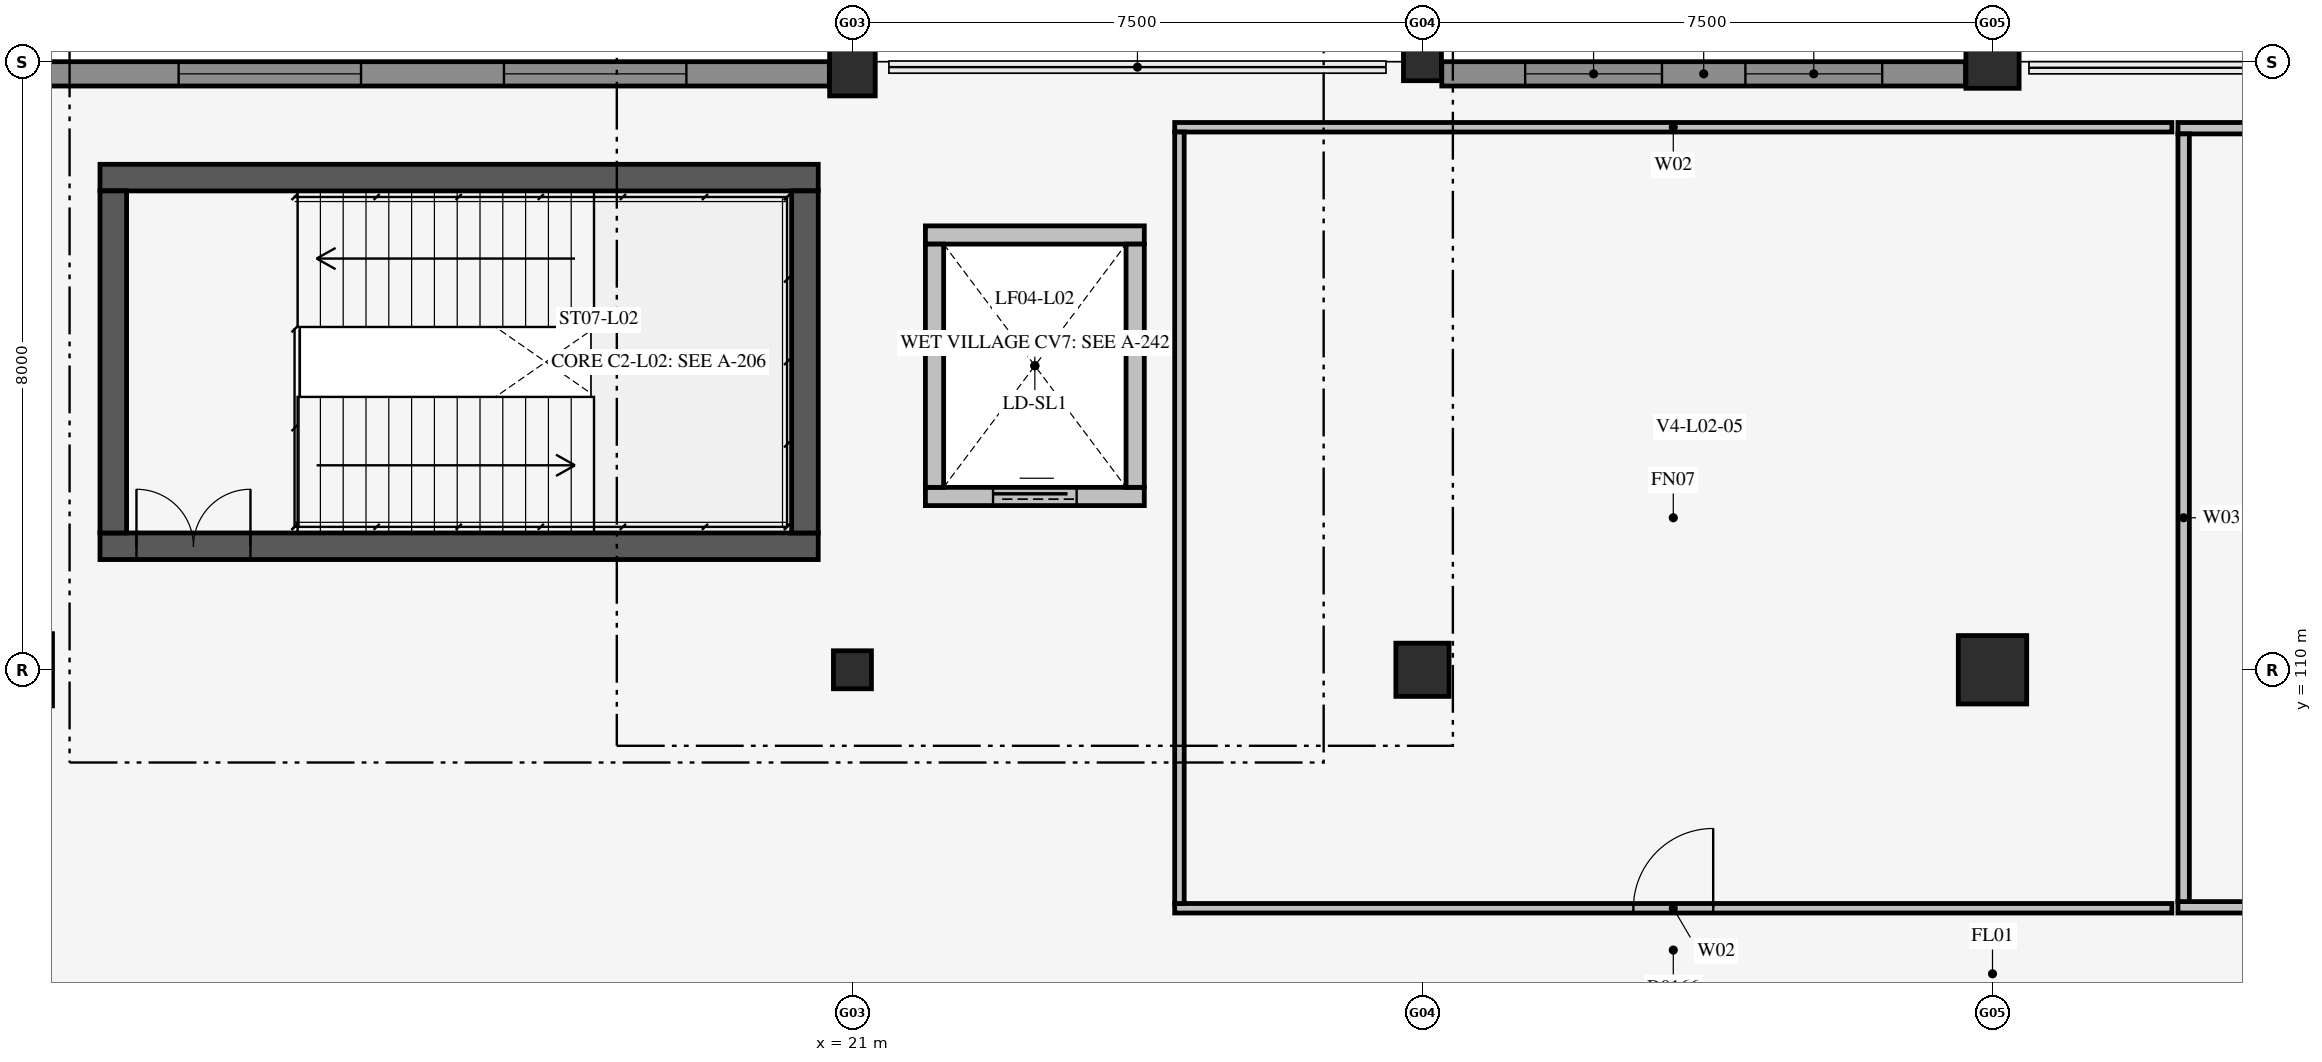
"""IFC4 building model, lengths in metres.
Left out: names, types, materials, properties, quantities, classifications, styles, units other than length and angle.
Written with IfcOpenShell. Run it as: python <this file> out.ifc"""

import sys

from ifc_helpers import new_model, si_unit, direction, frame, frame_2d, origin, origin_2d, place, context, subcontext, project, spatial, rectangle, circle, extrude, element, fill, save


model = new_model("IFC4")
c1 = context("Model", 3, precision=1e-05, world=origin(), true_north=direction((0.0, 1.0)))
c2 = subcontext(c1, "Body", "Model", "MODEL_VIEW")
j1 = project(units=[si_unit("LENGTHUNIT", "METRE"), si_unit("PLANEANGLEUNIT", "RADIAN")], contexts=[c1])
p1 = place(None, origin())
s1 = spatial("IfcSite", under=j1, at=p1, CompositionType="ELEMENT")
p2 = place(p1, origin())
s2 = spatial("IfcBuilding", under=s1, at=p2, CompositionType="ELEMENT")
p3 = place(p2, frame((0.0, 0.0, 10.2)))
s3 = spatial("IfcBuildingStorey", under=s2, at=p3, CompositionType="ELEMENT", Elevation=10.2)
p4 = place(p3, frame((11.1, 111.625, 0.0), z_axis=(0.0, 0.0, 1.0), x_axis=(1.0, 0.0, 0.0)))
e1 = element("IfcWall", 1, at=p4, inside=s3, PredefinedType="SHEAR", context=c2, shape_type="SweptSolid", body=[
    extrude(rectangle(XDim=9.45, YDim=0.35, at=frame_2d((4.725, 0.0))), origin(), (0.0, 0.0, 1.0), 4.25),
])
p5 = place(p4, frame((0.48, 0.0, 0.0)))
e2 = element("IfcOpeningElement", 2, at=p5, cuts=e1, PredefinedType="OPENING", context=c2, shape_type="SweptSolid", body=[
    extrude(rectangle(XDim=1.5, YDim=2.3, at=frame_2d((0.75, 1.15))), frame((0.0, 0.187, 0.0), z_axis=(0.0, -1.0, 0.0), x_axis=(1.0, 0.0, 0.0)), (0.0, 0.0, 1.0), 0.374),
])
p6 = place(p3, frame((11.1, 116.475, 0.0), z_axis=(0.0, 0.0, 1.0), x_axis=(1.0, 0.0, 0.0)))
e3 = element("IfcWall", 3, at=p6, inside=s3, PredefinedType="SHEAR", context=c2, shape_type="SweptSolid", body=[
    extrude(rectangle(XDim=9.45, YDim=0.35, at=frame_2d((4.725, 0.0))), origin(), (0.0, 0.0, 1.0), 4.25),
])
for number, where, z_axis, x_axis in (
    (4, (11.275, 111.8, 0.0), (0.0, 0.0, 1.0), (0.0, 1.0, 0.0)),
    (5, (20.375, 111.8, 0.0), (0.0, 0.0, 1.0), (0.0, 1.0, 0.0)),
):
    element("IfcWall", number, at=place(p3, frame(where, z_axis=z_axis, x_axis=x_axis)), inside=s3, PredefinedType="SHEAR", context=c2, shape_type="SweptSolid", body=[
        extrude(rectangle(XDim=4.5, YDim=0.35, at=frame_2d((2.25, 0.0))), origin(), (0.0, 0.0, 1.0), 4.25),
    ])
p7 = place(p3, frame((21.96, 112.28, 0.0), z_axis=(0.0, 0.0, 1.0), x_axis=(1.0, 0.0, 0.0)))
e6 = element("IfcWall", 6, at=p7, inside=s3, PredefinedType="SOLIDWALL", context=c2, shape_type="SweptSolid", body=[
    extrude(rectangle(XDim=2.88, YDim=0.24, at=frame_2d((1.44, 0.0))), origin(), (0.0, 0.0, 1.0), 3.45),
])
p8 = place(p7, frame((0.89, 0.0, 0.0)))
e7 = element("IfcOpeningElement", 7, at=p8, cuts=e6, PredefinedType="OPENING", context=c2, shape_type="SweptSolid", body=[
    extrude(rectangle(XDim=1.1, YDim=2.15, at=frame_2d((0.55, 1.075))), frame((0.0, 0.132, 0.0), z_axis=(0.0, -1.0, 0.0), x_axis=(1.0, 0.0, 0.0)), (0.0, 0.0, 1.0), 0.264),
])
p9 = place(p3, frame((21.96, 115.72, 0.0), z_axis=(0.0, 0.0, 1.0), x_axis=(1.0, 0.0, 0.0)))
e8 = element("IfcWall", 8, at=p9, inside=s3, PredefinedType="SOLIDWALL", context=c2, shape_type="SweptSolid", body=[
    extrude(rectangle(XDim=2.88, YDim=0.24, at=frame_2d((1.44, 0.0))), origin(), (0.0, 0.0, 1.0), 3.45),
])
for number, where, z_axis, x_axis in (
    (9, (22.08, 112.4, 0.0), (0.0, 0.0, 1.0), (0.0, 1.0, 0.0)),
    (10, (24.72, 112.4, 0.0), (0.0, 0.0, 1.0), (0.0, 1.0, 0.0)),
):
    element("IfcWall", number, at=place(p3, frame(where, z_axis=z_axis, x_axis=x_axis)), inside=s3, PredefinedType="SOLIDWALL", context=c2, shape_type="SweptSolid", body=[
        extrude(rectangle(XDim=3.2, YDim=0.24, at=frame_2d((1.6, 0.0))), origin(), (0.0, 0.0, 1.0), 3.45),
    ])
p10 = place(p3, frame((10.0, 110.0, 0.0), z_axis=(0.0, 0.0, 1.0), x_axis=(1.0, 0.0, 0.0)))
e11 = element("IfcColumn", 11, at=p10, inside=s3, PredefinedType="COLUMN", context=c2, shape_type="SweptSolid", body=[
    extrude(rectangle(XDim=0.95, YDim=0.95, at=origin_2d()), origin(), (0.0, 0.0, 1.0), 4.25),
])
p11 = place(p3, frame((21.0, 110.0, 0.0), z_axis=(0.0, 0.0, 1.0), x_axis=(1.0, 0.0, 0.0)))
e12 = element("IfcColumn", 12, at=p11, inside=s3, PredefinedType="COLUMN", context=c2, shape_type="SweptSolid", body=[
    extrude(circle(Radius=0.25, at=origin_2d()), origin(), (0.0, 0.0, 1.0), 4.25),
])
p12 = place(p3, frame((21.0, 118.0, 0.0), z_axis=(0.0, 0.0, 1.0), x_axis=(1.0, 0.0, 0.0)))
e13 = element("IfcColumn", 13, at=p12, inside=s3, PredefinedType="COLUMN", context=c2, shape_type="SweptSolid", body=[
    extrude(rectangle(XDim=0.6, YDim=0.9, at=origin_2d()), origin(), (0.0, 0.0, 1.0), 4.25),
])
p13 = place(p3, frame((28.5, 110.0, 0.0), z_axis=(0.0, 0.0, 1.0), x_axis=(1.0, 0.0, 0.0)))
e14 = element("IfcColumn", 14, at=p13, inside=s3, PredefinedType="COLUMN", context=c2, shape_type="SweptSolid", body=[
    extrude(circle(Radius=0.35, at=origin_2d()), origin(), (0.0, 0.0, 1.0), 4.25),
])
p14 = place(p3, frame((28.5, 118.0, 0.0), z_axis=(0.0, 0.0, 1.0), x_axis=(1.0, 0.0, 0.0)))
e15 = element("IfcColumn", 15, at=p14, inside=s3, PredefinedType="COLUMN", context=c2, shape_type="SweptSolid", body=[
    extrude(circle(Radius=0.25, at=origin_2d()), origin(), (0.0, 0.0, 1.0), 4.25),
])
p15 = place(p3, frame((36.0, 110.0, 0.0), z_axis=(0.0, 0.0, 1.0), x_axis=(1.0, 0.0, 0.0)))
e16 = element("IfcColumn", 16, at=p15, inside=s3, PredefinedType="COLUMN", context=c2, shape_type="SweptSolid", body=[
    extrude(circle(Radius=0.45, at=origin_2d()), origin(), (0.0, 0.0, 1.0), 4.25),
])
p16 = place(p3, frame((36.0, 118.0, 0.0), z_axis=(0.0, 0.0, 1.0), x_axis=(1.0, 0.0, 0.0)))
e17 = element("IfcColumn", 17, at=p16, inside=s3, PredefinedType="COLUMN", context=c2, shape_type="SweptSolid", body=[
    extrude(circle(Radius=0.35, at=origin_2d()), origin(), (0.0, 0.0, 1.0), 4.25),
])
p17 = place(p3, frame((25.24, 106.863, 0.0), z_axis=(0.0, 0.0, 1.0), x_axis=(1.0, 0.0, 0.0)))
e18 = element("IfcWall", 18, at=p17, inside=s3, PredefinedType="PARTITIONING", context=c2, shape_type="SweptSolid", body=[
    extrude(rectangle(XDim=13.12, YDim=0.125, at=frame_2d((6.56, 0.0))), origin(), (0.0, 0.0, 1.0), 4.235),
])
p18 = place(p17, frame((6.035, 0.0, 0.0)))
e19 = element("IfcOpeningElement", 19, at=p18, cuts=e18, PredefinedType="OPENING", context=c2, shape_type="SweptSolid", body=[
    extrude(rectangle(XDim=1.05, YDim=2.15, at=frame_2d((0.525, 1.075))), frame((0.0, 0.074, 0.0), z_axis=(0.0, -1.0, 0.0), x_axis=(1.0, 0.0, 0.0)), (0.0, 0.0, 1.0), 0.149),
])
p19 = place(p3, frame((25.24, 117.137, 0.0), z_axis=(0.0, 0.0, 1.0), x_axis=(1.0, 0.0, 0.0)))
e20 = element("IfcWall", 20, at=p19, inside=s3, PredefinedType="PARTITIONING", context=c2, shape_type="SweptSolid", body=[
    extrude(rectangle(XDim=13.12, YDim=0.125, at=frame_2d((6.56, 0.0))), origin(), (0.0, 0.0, 1.0), 4.235),
])
p20 = place(p3, frame((25.302, 106.925, 0.0), z_axis=(0.0, 0.0, 1.0), x_axis=(0.0, 1.0, 0.0)))
e21 = element("IfcWall", 21, at=p20, inside=s3, PredefinedType="PARTITIONING", context=c2, shape_type="SweptSolid", body=[
    extrude(rectangle(XDim=10.15, YDim=0.125, at=frame_2d((5.075, 0.0))), origin(), (0.0, 0.0, 1.0), 4.235),
])
p21 = place(p3, frame((38.44, 106.875, 0.0), z_axis=(0.0, 0.0, 1.0), x_axis=(1.0, 0.0, 0.0)))
e22 = element("IfcWall", 22, at=p21, inside=s3, PredefinedType="PARTITIONING", context=c2, shape_type="SweptSolid", body=[
    extrude(rectangle(XDim=13.12, YDim=0.15, at=frame_2d((6.56, 0.0))), origin(), (0.0, 0.0, 1.0), 4.235),
])
p22 = place(p21, frame((3.28, 0.0, 0.0)))
e23 = element("IfcOpeningElement", 23, at=p22, cuts=e22, PredefinedType="OPENING", context=c2, shape_type="SweptSolid", body=[
    extrude(rectangle(XDim=1.1, YDim=2.25, at=frame_2d((0.55, 1.125))), frame((0.0, 0.087, 0.0), z_axis=(0.0, -1.0, 0.0), x_axis=(1.0, 0.0, 0.0)), (0.0, 0.0, 1.0), 0.174),
])
p23 = place(p3, frame((38.44, 117.125, 0.0), z_axis=(0.0, 0.0, 1.0), x_axis=(1.0, 0.0, 0.0)))
e24 = element("IfcWall", 24, at=p23, inside=s3, PredefinedType="PARTITIONING", context=c2, shape_type="SweptSolid", body=[
    extrude(rectangle(XDim=13.12, YDim=0.15, at=frame_2d((6.56, 0.0))), origin(), (0.0, 0.0, 1.0), 4.235),
])
p24 = place(p3, frame((38.515, 106.95, 0.0), z_axis=(0.0, 0.0, 1.0), x_axis=(0.0, 1.0, 0.0)))
e25 = element("IfcWall", 25, at=p24, inside=s3, PredefinedType="PARTITIONING", context=c2, shape_type="SweptSolid", body=[
    extrude(rectangle(XDim=10.1, YDim=0.15, at=frame_2d((5.05, 0.0))), origin(), (0.0, 0.0, 1.0), 4.235),
])
p25 = place(p3, frame((10.254, 117.84, 0.0), z_axis=(0.0, 0.0, 1.0), x_axis=(1.0, 0.0, 0.0)))
e26 = element("IfcWall", 26, at=p25, inside=s3, PredefinedType="SOLIDWALL", context=c2, shape_type="SweptSolid", body=[
    extrude(rectangle(XDim=10.442, YDim=0.32, at=frame_2d((5.221, 0.0))), origin(), (0.0, 0.0, 1.0), 3.807),
])
p26 = place(p25, frame((1.881, 0.0, 0.95)))
e27 = element("IfcOpeningElement", 27, at=p26, cuts=e26, PredefinedType="OPENING", context=c2, shape_type="SweptSolid", body=[
    extrude(rectangle(XDim=2.4, YDim=1.2, at=frame_2d((1.2, 0.6))), frame((0.0, 0.172, 0.0), z_axis=(0.0, -1.0, 0.0), x_axis=(1.0, 0.0, 0.0)), (0.0, 0.0, 1.0), 0.344),
])
p27 = place(p25, frame((6.161, 0.0, 0.95)))
e28 = element("IfcOpeningElement", 28, at=p27, cuts=e26, PredefinedType="OPENING", context=c2, shape_type="SweptSolid", body=[
    extrude(rectangle(XDim=2.4, YDim=1.2, at=frame_2d((1.2, 0.6))), frame((0.0, 0.172, 0.0), z_axis=(0.0, -1.0, 0.0), x_axis=(1.0, 0.0, 0.0)), (0.0, 0.0, 1.0), 0.344),
])
p28 = place(p3, frame((28.754, 117.84, 0.0), z_axis=(0.0, 0.0, 1.0), x_axis=(1.0, 0.0, 0.0)))
e29 = element("IfcWall", 29, at=p28, inside=s3, PredefinedType="SOLIDWALL", context=c2, shape_type="SweptSolid", body=[
    extrude(rectangle(XDim=6.892, YDim=0.32, at=frame_2d((3.446, 0.0))), origin(), (0.0, 0.0, 1.0), 3.684),
])
p29 = place(p28, frame((1.097, 0.0, 0.95)))
e30 = element("IfcOpeningElement", 30, at=p29, cuts=e29, PredefinedType="OPENING", context=c2, shape_type="SweptSolid", body=[
    extrude(rectangle(XDim=1.8, YDim=1.5, at=frame_2d((0.9, 0.75))), frame((0.0, 0.172, 0.0), z_axis=(0.0, -1.0, 0.0), x_axis=(1.0, 0.0, 0.0)), (0.0, 0.0, 1.0), 0.344),
])
p30 = place(p28, frame((3.995, 0.0, 0.95)))
e31 = element("IfcOpeningElement", 31, at=p30, cuts=e29, PredefinedType="OPENING", context=c2, shape_type="SweptSolid", body=[
    extrude(rectangle(XDim=1.8, YDim=1.5, at=frame_2d((0.9, 0.75))), frame((0.0, 0.172, 0.0), z_axis=(0.0, -1.0, 0.0), x_axis=(1.0, 0.0, 0.0)), (0.0, 0.0, 1.0), 0.344),
])
p31 = place(p5, origin())
e32 = element("IfcDoor", 32, at=p31, inside=s3, OperationType="DOUBLE_DOOR_SINGLE_SWING", PredefinedType="DOOR", context=c2, shape_type="SweptSolid", body=[
    extrude(rectangle(XDim=1.5, YDim=2.3, at=frame_2d((0.75, 1.15))), frame((0.0, 0.025, 0.0), z_axis=(0.0, -1.0, 0.0), x_axis=(1.0, 0.0, 0.0)), (0.0, 0.0, 1.0), 0.05),
])
fill(e2, e32)
p32 = place(p18, origin())
e33 = element("IfcDoor", 33, at=p32, inside=s3, OperationType="SINGLE_SWING_RIGHT", PredefinedType="DOOR", context=c2, shape_type="SweptSolid", body=[
    extrude(rectangle(XDim=1.05, YDim=2.15, at=frame_2d((0.525, 1.075))), frame((0.0, 0.025, 0.0), z_axis=(0.0, -1.0, 0.0), x_axis=(1.0, 0.0, 0.0)), (0.0, 0.0, 1.0), 0.05),
])
fill(e19, e33)
p33 = place(p26, origin())
e34 = element("IfcWindow", 34, at=p33, inside=s3, PartitioningType="SINGLE_PANEL", PredefinedType="WINDOW", context=c2, shape_type="SweptSolid", body=[
    extrude(rectangle(XDim=2.4, YDim=1.2, at=frame_2d((1.2, 0.6))), frame((0.0, 0.03, 0.0), z_axis=(0.0, -1.0, 0.0), x_axis=(1.0, 0.0, 0.0)), (0.0, 0.0, 1.0), 0.06),
])
fill(e27, e34)
p34 = place(p27, origin())
e35 = element("IfcWindow", 35, at=p34, inside=s3, PartitioningType="SINGLE_PANEL", PredefinedType="WINDOW", context=c2, shape_type="SweptSolid", body=[
    extrude(rectangle(XDim=2.4, YDim=1.2, at=frame_2d((1.2, 0.6))), frame((0.0, 0.03, 0.0), z_axis=(0.0, -1.0, 0.0), x_axis=(1.0, 0.0, 0.0)), (0.0, 0.0, 1.0), 0.06),
])
fill(e28, e35)
p35 = place(p29, origin())
e36 = element("IfcWindow", 36, at=p35, inside=s3, PartitioningType="SINGLE_PANEL", PredefinedType="WINDOW", context=c2, shape_type="SweptSolid", body=[
    extrude(rectangle(XDim=1.8, YDim=1.5, at=frame_2d((0.9, 0.75))), frame((0.0, 0.03, 0.0), z_axis=(0.0, -1.0, 0.0), x_axis=(1.0, 0.0, 0.0)), (0.0, 0.0, 1.0), 0.06),
])
fill(e30, e36)
p36 = place(p30, origin())
e37 = element("IfcWindow", 37, at=p36, inside=s3, PartitioningType="SINGLE_PANEL", PredefinedType="WINDOW", context=c2, shape_type="SweptSolid", body=[
    extrude(rectangle(XDim=1.8, YDim=1.5, at=frame_2d((0.9, 0.75))), frame((0.0, 0.03, 0.0), z_axis=(0.0, -1.0, 0.0), x_axis=(1.0, 0.0, 0.0)), (0.0, 0.0, 1.0), 0.06),
])
fill(e31, e37)
p37 = place(p8, origin())
e38 = element("IfcDoor", 38, at=p37, inside=s3, OperationType="SLIDING_TO_RIGHT", PredefinedType="USERDEFINED", context=c2, shape_type="SweptSolid", body=[
    extrude(rectangle(XDim=1.1, YDim=2.15, at=frame_2d((0.55, 1.075))), frame((0.0, 0.025, 0.0), z_axis=(0.0, -1.0, 0.0), x_axis=(1.0, 0.0, 0.0)), (0.0, 0.0, 1.0), 0.05),
])
fill(e7, e38)
save(model, sys.argv[1])
